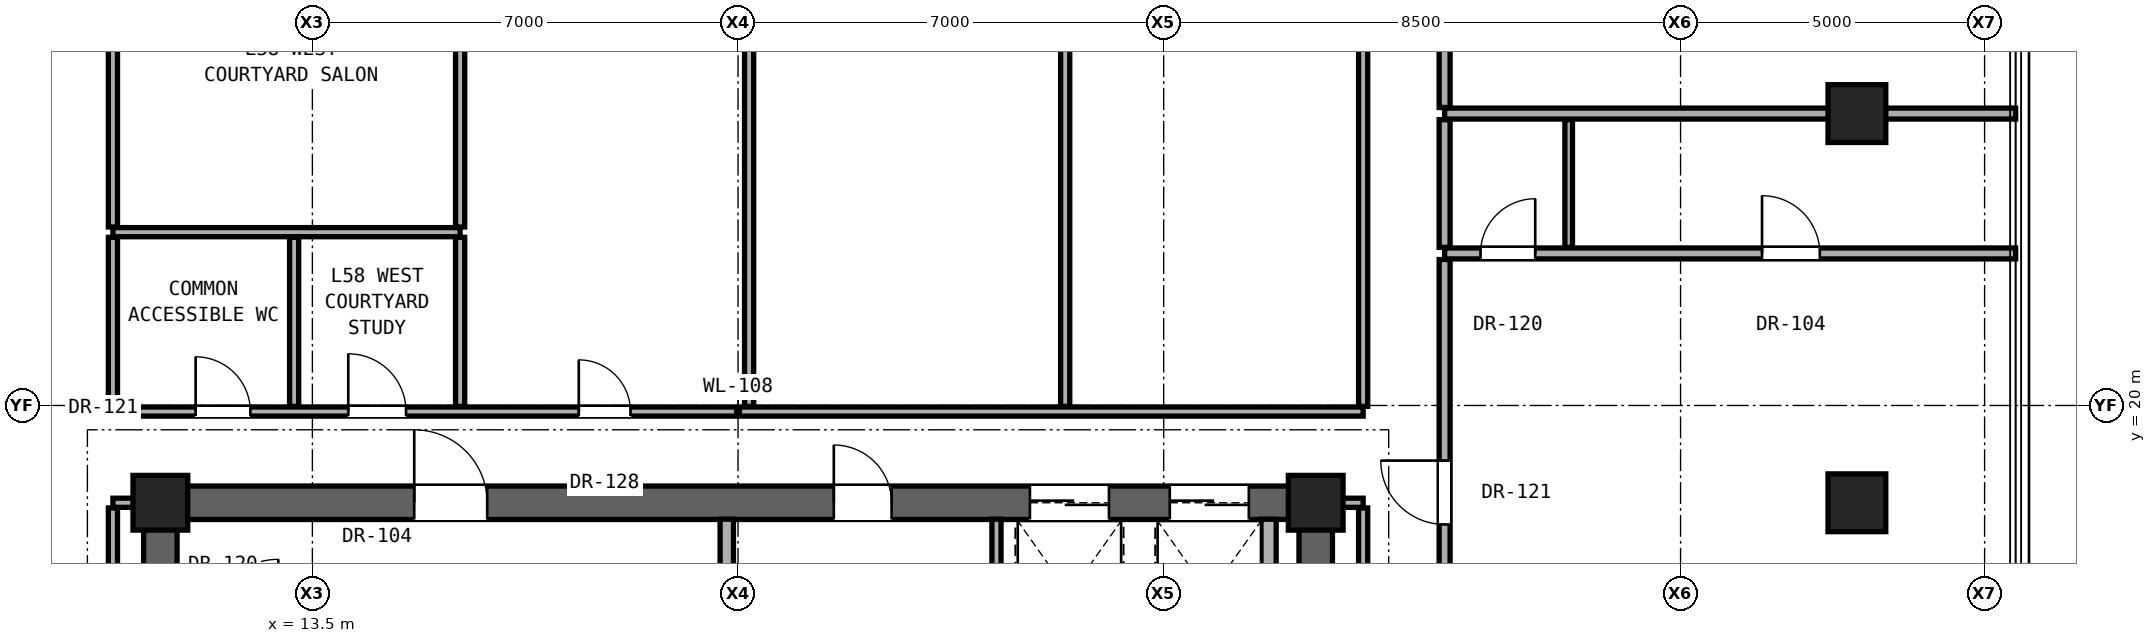
"""IFC4 building model, lengths in metres.
Left out: names, types, materials, properties, quantities, classifications, styles, units other than length and angle.
Written with IfcOpenShell. Run it as: python <this file> out.ifc"""

import sys

from ifc_helpers import new_model, si_unit, direction, frame, frame_2d, origin, origin_2d, place, context, subcontext, project, spatial, rectangle, hollow_rectangle, extrude, element, fill, save


model = new_model("IFC4")
c1 = context("Model", 3, precision=1e-05, world=origin(), true_north=direction((0.0, 1.0)))
c2 = subcontext(c1, "Body", "Model", "MODEL_VIEW")
j1 = project(units=[si_unit("LENGTHUNIT", "METRE"), si_unit("PLANEANGLEUNIT", "RADIAN")], contexts=[c1])
p1 = place(None, origin())
s1 = spatial("IfcSite", under=j1, at=p1, CompositionType="ELEMENT")
p2 = place(p1, origin())
s2 = spatial("IfcBuilding", under=s1, at=p2, CompositionType="ELEMENT")
p3 = place(p2, frame((0.0, 0.0, 203.15)))
s3 = spatial("IfcBuildingStorey", under=s2, at=p3, CompositionType="ELEMENT", Elevation=203.15)
for number, where, z_axis, x_axis in (
    (1, (11.0, 18.4, 0.0), (0.0, 0.0, 1.0), (1.0, 0.0, 0.0)),
    (2, (30.0, 18.4, 0.0), (0.0, 0.0, 1.0), (1.0, 0.0, 0.0)),
):
    element("IfcColumn", number, at=place(p3, frame(where, z_axis=z_axis, x_axis=x_axis)), inside=s3, PredefinedType="COLUMN", context=c2, shape_type="SweptSolid", body=[
        extrude(rectangle(XDim=0.9, YDim=0.9, at=origin_2d()), origin(), (0.0, 0.0, 1.0), 3.25),
    ])
for number, where, z_axis, x_axis in (
    (3, (38.9, 18.4, 0.0), (0.0, 0.0, 1.0), (1.0, 0.0, 0.0)),
    (4, (38.9, 24.8, 0.0), (0.0, 0.0, 1.0), (1.0, 0.0, 0.0)),
):
    element("IfcColumn", number, at=place(p3, frame(where, z_axis=z_axis, x_axis=x_axis)), inside=s3, PredefinedType="COLUMN", context=c2, shape_type="SweptSolid", body=[
        extrude(hollow_rectangle(XDim=0.95, YDim=0.95, WallThickness=0.05, at=origin_2d()), origin(), (0.0, 0.0, 1.0), 3.25),
    ])
for number, where, z_axis, x_axis in (
    (5, (11.0, 12.4, 0.0), (0.0, 0.0, 1.0), (0.0, 1.0, 0.0)),
    (6, (30.0, 12.4, 0.0), (0.0, 0.0, 1.0), (0.0, 1.0, 0.0)),
):
    element("IfcWall", number, at=place(p3, frame(where, z_axis=z_axis, x_axis=x_axis)), inside=s3, PredefinedType="SHEAR", context=c2, shape_type="SweptSolid", body=[
        extrude(rectangle(XDim=6.0, YDim=0.55, at=frame_2d((3.0, 0.0))), origin(), (0.0, 0.0, 1.0), 3.05),
    ])
p4 = place(p3, frame((11.0, 18.4, 0.0), z_axis=(0.0, 0.0, 1.0), x_axis=(1.0, 0.0, 0.0)))
e7 = element("IfcWall", 7, at=p4, inside=s3, PredefinedType="SHEAR", context=c2, shape_type="SweptSolid", body=[
    extrude(rectangle(XDim=19.0, YDim=0.55, at=frame_2d((9.5, 0.0))), origin(), (0.0, 0.0, 1.0), 3.05),
])
p5 = place(p4, frame((4.175, 0.0, 0.0)))
e8 = element("IfcOpeningElement", 8, at=p5, cuts=e7, PredefinedType="OPENING", context=c2, shape_type="SweptSolid", body=[
    extrude(rectangle(XDim=1.2, YDim=2.25, at=frame_2d((0.6, 1.125))), frame((0.0, 0.285, 0.0), z_axis=(0.0, -1.0, 0.0), x_axis=(1.0, 0.0, 0.0)), (0.0, 0.0, 1.0), 0.57),
])
p6 = place(p4, frame((11.075, 0.0, 0.0)))
e9 = element("IfcOpeningElement", 9, at=p6, cuts=e7, PredefinedType="OPENING", context=c2, shape_type="SweptSolid", body=[
    extrude(rectangle(XDim=0.95, YDim=2.15, at=frame_2d((0.475, 1.075))), frame((0.0, 0.285, 0.0), z_axis=(0.0, -1.0, 0.0), x_axis=(1.0, 0.0, 0.0)), (0.0, 0.0, 1.0), 0.57),
])
p7 = place(p4, frame((14.3, 0.0, 0.0)))
e10 = element("IfcOpeningElement", 10, at=p7, cuts=e7, PredefinedType="OPENING", context=c2, shape_type="SweptSolid", body=[
    extrude(rectangle(XDim=1.3, YDim=2.3, at=frame_2d((0.65, 1.15))), frame((0.0, 0.285, 0.0), z_axis=(0.0, -1.0, 0.0), x_axis=(1.0, 0.0, 0.0)), (0.0, 0.0, 1.0), 0.57),
])
p8 = place(p4, frame((16.6, 0.0, 0.0)))
e11 = element("IfcOpeningElement", 11, at=p8, cuts=e7, PredefinedType="OPENING", context=c2, shape_type="SweptSolid", body=[
    extrude(rectangle(XDim=1.3, YDim=2.3, at=frame_2d((0.65, 1.15))), frame((0.0, 0.285, 0.0), z_axis=(0.0, -1.0, 0.0), x_axis=(1.0, 0.0, 0.0)), (0.0, 0.0, 1.0), 0.57),
])
for number, where, z_axis, x_axis in (
    (12, (10.22, 18.4, 0.0), (0.0, 0.0, 1.0), (1.0, 0.0, 0.0)),
    (13, (30.27, 18.4, 0.0), (0.0, 0.0, 1.0), (1.0, 0.0, 0.0)),
):
    element("IfcWall", number, at=place(p3, frame(where, z_axis=z_axis, x_axis=x_axis)), inside=s3, PredefinedType="PARTITIONING", context=c2, shape_type="SweptSolid", body=[
        extrude(rectangle(XDim=0.51, YDim=0.15, at=frame_2d((0.255, 0.0))), origin(), (0.0, 0.0, 1.0), 2.442),
    ])
p9 = place(p3, frame((10.22, 19.9, 0.0), z_axis=(0.0, 0.0, 1.0), x_axis=(1.0, 0.0, 0.0)))
e14 = element("IfcWall", 14, at=p9, inside=s3, PredefinedType="PARTITIONING", context=c2, shape_type="SweptSolid", body=[
    extrude(rectangle(XDim=20.56, YDim=0.15, at=frame_2d((10.28, 0.0))), origin(), (0.0, 0.0, 1.0), 2.186),
])
p10 = place(p9, frame((1.36, 0.0, 0.0)))
e15 = element("IfcOpeningElement", 15, at=p10, cuts=e14, PredefinedType="OPENING", context=c2, shape_type="SweptSolid", body=[
    extrude(rectangle(XDim=0.9, YDim=2.1, at=frame_2d((0.45, 1.05))), frame((0.0, 0.085, 0.0), z_axis=(0.0, -1.0, 0.0), x_axis=(1.0, 0.0, 0.0)), (0.0, 0.0, 1.0), 0.17),
])
p11 = place(p9, frame((3.87, 0.0, 0.0)))
e16 = element("IfcOpeningElement", 16, at=p11, cuts=e14, PredefinedType="OPENING", context=c2, shape_type="SweptSolid", body=[
    extrude(rectangle(XDim=0.95, YDim=2.15, at=frame_2d((0.475, 1.075))), frame((0.0, 0.085, 0.0), z_axis=(0.0, -1.0, 0.0), x_axis=(1.0, 0.0, 0.0)), (0.0, 0.0, 1.0), 0.17),
])
p12 = place(p9, frame((7.661, 0.0, 0.0)))
e17 = element("IfcOpeningElement", 17, at=p12, cuts=e14, PredefinedType="OPENING", context=c2, shape_type="SweptSolid", body=[
    extrude(rectangle(XDim=0.85, YDim=2.01, at=frame_2d((0.425, 1.005))), frame((0.0, 0.085, 0.0), z_axis=(0.0, -1.0, 0.0), x_axis=(1.0, 0.0, 0.0)), (0.0, 0.0, 1.0), 0.17),
])
p13 = place(p3, frame((32.12, 22.5, 0.0), z_axis=(0.0, 0.0, 1.0), x_axis=(1.0, 0.0, 0.0)))
e18 = element("IfcWall", 18, at=p13, inside=s3, PredefinedType="PARTITIONING", context=c2, shape_type="SweptSolid", body=[
    extrude(rectangle(XDim=9.39, YDim=0.18, at=frame_2d((4.695, 0.0))), origin(), (0.0, 0.0, 1.0), 2.269),
])
p14 = place(p13, frame((5.22, 0.0, 0.0)))
e19 = element("IfcOpeningElement", 19, at=p14, cuts=e18, PredefinedType="OPENING", context=c2, shape_type="SweptSolid", body=[
    extrude(rectangle(XDim=0.95, YDim=2.15, at=frame_2d((0.475, 1.075))), frame((0.0, 0.1, 0.0), z_axis=(0.0, -1.0, 0.0), x_axis=(1.0, 0.0, 0.0)), (0.0, 0.0, 1.0), 0.2),
])
p15 = place(p13, frame((0.59, 0.0, 0.0)))
e20 = element("IfcOpeningElement", 20, at=p15, cuts=e18, PredefinedType="OPENING", context=c2, shape_type="SweptSolid", body=[
    extrude(rectangle(XDim=0.9, YDim=2.1, at=frame_2d((0.45, 1.05))), frame((0.0, 0.1, 0.0), z_axis=(0.0, -1.0, 0.0), x_axis=(1.0, 0.0, 0.0)), (0.0, 0.0, 1.0), 0.2),
])
p16 = place(p3, frame((10.22, 22.85, 0.0), z_axis=(0.0, 0.0, 1.0), x_axis=(1.0, 0.0, 0.0)))
e21 = element("IfcWall", 21, at=p16, inside=s3, PredefinedType="PARTITIONING", context=c2, shape_type="SweptSolid", body=[
    extrude(rectangle(XDim=5.71, YDim=0.15, at=frame_2d((2.855, 0.0))), origin(), (0.0, 0.0, 1.0), 2.186),
])
p17 = place(p3, frame((32.12, 24.8, 0.0), z_axis=(0.0, 0.0, 1.0), x_axis=(1.0, 0.0, 0.0)))
e22 = element("IfcWall", 22, at=p17, inside=s3, PredefinedType="PARTITIONING", context=c2, shape_type="SweptSolid", body=[
    extrude(rectangle(XDim=9.39, YDim=0.18, at=frame_2d((4.695, 0.0))), origin(), (0.0, 0.0, 1.0), 2.269),
])
p18 = place(p3, frame((10.22, 12.335, 0.0), z_axis=(0.0, 0.0, 1.0), x_axis=(0.0, 1.0, 0.0)))
e23 = element("IfcWall", 23, at=p18, inside=s3, PredefinedType="PARTITIONING", context=c2, shape_type="SweptSolid", body=[
    extrude(rectangle(XDim=5.98, YDim=0.15, at=frame_2d((2.99, 0.0))), origin(), (0.0, 0.0, 1.0), 2.442),
])
p19 = place(p3, frame((10.22, 19.985, 0.0), z_axis=(0.0, 0.0, 1.0), x_axis=(0.0, 1.0, 0.0)))
e24 = element("IfcWall", 24, at=p19, inside=s3, PredefinedType="PARTITIONING", context=c2, shape_type="SweptSolid", body=[
    extrude(rectangle(XDim=2.78, YDim=0.15, at=frame_2d((1.39, 0.0))), origin(), (0.0, 0.0, 1.0), 3.05),
])
p20 = place(p3, frame((10.22, 22.935, 0.0), z_axis=(0.0, 0.0, 1.0), x_axis=(0.0, 1.0, 0.0)))
e25 = element("IfcWall", 25, at=p20, inside=s3, PredefinedType="PARTITIONING", context=c2, shape_type="SweptSolid", body=[
    extrude(rectangle(XDim=10.08, YDim=0.15, at=frame_2d((5.04, 0.0))), origin(), (0.0, 0.0, 1.0), 2.346),
])
p21 = place(p20, frame((4.565, 0.0, 0.0)))
e26 = element("IfcOpeningElement", 26, at=p21, cuts=e25, PredefinedType="OPENING", context=c2, shape_type="SweptSolid", body=[
    extrude(rectangle(XDim=0.95, YDim=2.15, at=frame_2d((0.475, 1.075))), frame((0.0, 0.085, 0.0), z_axis=(0.0, -1.0, 0.0), x_axis=(1.0, 0.0, 0.0)), (0.0, 0.0, 1.0), 0.17),
])
for number, where, z_axis, x_axis in (
    (27, (13.2, 19.985, 0.0), (0.0, 0.0, 1.0), (0.0, 1.0, 0.0)),
    (28, (15.93, 19.985, 0.0), (0.0, 0.0, 1.0), (0.0, 1.0, 0.0)),
):
    element("IfcWall", number, at=place(p3, frame(where, z_axis=z_axis, x_axis=x_axis)), inside=s3, PredefinedType="PARTITIONING", context=c2, shape_type="SweptSolid", body=[
        extrude(rectangle(XDim=2.78, YDim=0.15, at=frame_2d((1.39, 0.0))), origin(), (0.0, 0.0, 1.0), 3.05),
    ])
p22 = place(p3, frame((15.93, 22.935, 0.0), z_axis=(0.0, 0.0, 1.0), x_axis=(0.0, 1.0, 0.0)))
e29 = element("IfcWall", 29, at=p22, inside=s3, PredefinedType="PARTITIONING", context=c2, shape_type="SweptSolid", body=[
    extrude(rectangle(XDim=10.08, YDim=0.15, at=frame_2d((5.04, 0.0))), origin(), (0.0, 0.0, 1.0), 2.186),
])
p23 = place(p3, frame((20.315, 16.555, 0.0), z_axis=(0.0, 0.0, 1.0), x_axis=(0.0, 1.0, 0.0)))
e30 = element("IfcWall", 30, at=p23, inside=s3, PredefinedType="SOLIDWALL", context=c2, shape_type="SweptSolid", body=[
    extrude(rectangle(XDim=1.575, YDim=0.22, at=frame_2d((0.788, 0.0))), origin(), (0.0, 0.0, 1.0), 3.05),
])
p24 = place(p3, frame((20.682, 19.985, 0.0), z_axis=(0.0, 0.0, 1.0), x_axis=(0.0, 1.0, 0.0)))
e31 = element("IfcWall", 31, at=p24, inside=s3, PredefinedType="PARTITIONING", context=c2, shape_type="SweptSolid", body=[
    extrude(rectangle(XDim=13.03, YDim=0.15, at=frame_2d((6.515, 0.0))), origin(), (0.0, 0.0, 1.0), 2.186),
])
p25 = place(p3, frame((24.75, 15.573, 0.0), z_axis=(0.0, 0.0, 1.0), x_axis=(0.0, 1.0, 0.0)))
e32 = element("IfcWall", 32, at=p25, inside=s3, PredefinedType="PARTITIONING", context=c2, shape_type="SweptSolid", body=[
    extrude(rectangle(XDim=2.557, YDim=0.15, at=frame_2d((1.279, 0.0))), origin(), (0.0, 0.0, 1.0), 3.05),
])
p26 = place(p3, frame((25.88, 19.985, 0.0), z_axis=(0.0, 0.0, 1.0), x_axis=(0.0, 1.0, 0.0)))
e33 = element("IfcWall", 33, at=p26, inside=s3, PredefinedType="PARTITIONING", context=c2, shape_type="SweptSolid", body=[
    extrude(rectangle(XDim=13.03, YDim=0.15, at=frame_2d((6.515, 0.0))), origin(), (0.0, 0.0, 1.0), 2.186),
])
p27 = place(p3, frame((29.225, 15.573, 0.0), z_axis=(0.0, 0.0, 1.0), x_axis=(0.0, 1.0, 0.0)))
e34 = element("IfcWall", 34, at=p27, inside=s3, PredefinedType="SOLIDWALL", context=c2, shape_type="SweptSolid", body=[
    extrude(rectangle(XDim=2.557, YDim=0.25, at=frame_2d((1.279, 0.0))), origin(), (0.0, 0.0, 1.0), 3.05),
])
p28 = place(p3, frame((30.78, 12.335, 0.0), z_axis=(0.0, 0.0, 1.0), x_axis=(0.0, 1.0, 0.0)))
e35 = element("IfcWall", 35, at=p28, inside=s3, PredefinedType="PARTITIONING", context=c2, shape_type="SweptSolid", body=[
    extrude(rectangle(XDim=5.98, YDim=0.15, at=frame_2d((2.99, 0.0))), origin(), (0.0, 0.0, 1.0), 2.442),
])
p29 = place(p3, frame((30.78, 19.985, 0.0), z_axis=(0.0, 0.0, 1.0), x_axis=(0.0, 1.0, 0.0)))
e36 = element("IfcWall", 36, at=p29, inside=s3, PredefinedType="PARTITIONING", context=c2, shape_type="SweptSolid", body=[
    extrude(rectangle(XDim=13.03, YDim=0.15, at=frame_2d((6.515, 0.0))), origin(), (0.0, 0.0, 1.0), 2.346),
])
p30 = place(p3, frame((32.12, 14.737, 0.0), z_axis=(0.0, 0.0, 1.0), x_axis=(0.0, 1.0, 0.0)))
e37 = element("IfcWall", 37, at=p30, inside=s3, PredefinedType="PARTITIONING", context=c2, shape_type="SweptSolid", body=[
    extrude(rectangle(XDim=7.663, YDim=0.18, at=frame_2d((3.832, 0.0))), origin(), (0.0, 0.0, 1.0), 2.442),
])
p31 = place(p30, frame((3.306, 0.0, 0.0)))
e38 = element("IfcOpeningElement", 38, at=p31, cuts=e37, PredefinedType="OPENING", context=c2, shape_type="SweptSolid", body=[
    extrude(rectangle(XDim=1.05, YDim=2.2, at=frame_2d((0.525, 1.1))), frame((0.0, 0.1, 0.0), z_axis=(0.0, -1.0, 0.0), x_axis=(1.0, 0.0, 0.0)), (0.0, 0.0, 1.0), 0.2),
])
p32 = place(p3, frame((32.12, 22.6, 0.0), z_axis=(0.0, 0.0, 1.0), x_axis=(0.0, 1.0, 0.0)))
e39 = element("IfcWall", 39, at=p32, inside=s3, PredefinedType="PARTITIONING", context=c2, shape_type="SweptSolid", body=[
    extrude(rectangle(XDim=2.1, YDim=0.18, at=frame_2d((1.05, 0.0))), origin(), (0.0, 0.0, 1.0), 2.346),
])
p33 = place(p3, frame((32.12, 24.9, 0.0), z_axis=(0.0, 0.0, 1.0), x_axis=(0.0, 1.0, 0.0)))
e40 = element("IfcWall", 40, at=p33, inside=s3, PredefinedType="PARTITIONING", context=c2, shape_type="SweptSolid", body=[
    extrude(rectangle(XDim=3.9, YDim=0.18, at=frame_2d((1.95, 0.0))), origin(), (0.0, 0.0, 1.0), 2.346),
])
p34 = place(p33, frame((1.425, 0.0, 0.0)))
e41 = element("IfcOpeningElement", 41, at=p34, cuts=e40, PredefinedType="OPENING", context=c2, shape_type="SweptSolid", body=[
    extrude(rectangle(XDim=1.05, YDim=2.2, at=frame_2d((0.525, 1.1))), frame((0.0, 0.1, 0.0), z_axis=(0.0, -1.0, 0.0), x_axis=(1.0, 0.0, 0.0)), (0.0, 0.0, 1.0), 0.2),
])
p35 = place(p3, frame((34.16, 22.6, 0.0), z_axis=(0.0, 0.0, 1.0), x_axis=(0.0, 1.0, 0.0)))
e42 = element("IfcWall", 42, at=p35, inside=s3, PredefinedType="PARTITIONING", context=c2, shape_type="SweptSolid", body=[
    extrude(rectangle(XDim=2.1, YDim=0.125, at=frame_2d((1.05, 0.0))), origin(), (0.0, 0.0, 1.0), 2.346),
])
p36 = place(p5, origin())
e43 = element("IfcDoor", 43, at=p36, inside=s3, OperationType="SINGLE_SWING_LEFT", PredefinedType="DOOR", context=c2, shape_type="SweptSolid", body=[
    extrude(rectangle(XDim=1.2, YDim=2.25, at=frame_2d((0.6, 1.125))), frame((0.0, 0.025, 0.0), z_axis=(0.0, -1.0, 0.0), x_axis=(1.0, 0.0, 0.0)), (0.0, 0.0, 1.0), 0.05),
])
fill(e8, e43)
p37 = place(p6, origin())
e44 = element("IfcDoor", 44, at=p37, inside=s3, OperationType="SINGLE_SWING_LEFT", PredefinedType="DOOR", context=c2, shape_type="SweptSolid", body=[
    extrude(rectangle(XDim=0.95, YDim=2.15, at=frame_2d((0.475, 1.075))), frame((0.0, 0.025, 0.0), z_axis=(0.0, -1.0, 0.0), x_axis=(1.0, 0.0, 0.0)), (0.0, 0.0, 1.0), 0.05),
])
fill(e9, e44)
p38 = place(p10, origin())
e45 = element("IfcDoor", 45, at=p38, inside=s3, OperationType="SINGLE_SWING_LEFT", PredefinedType="DOOR", context=c2, shape_type="SweptSolid", body=[
    extrude(rectangle(XDim=0.9, YDim=2.1, at=frame_2d((0.45, 1.05))), frame((0.0, 0.025, 0.0), z_axis=(0.0, -1.0, 0.0), x_axis=(1.0, 0.0, 0.0)), (0.0, 0.0, 1.0), 0.05),
])
fill(e15, e45)
p39 = place(p31, origin())
e46 = element("IfcDoor", 46, at=p39, inside=s3, OperationType="SINGLE_SWING_RIGHT", PredefinedType="DOOR", context=c2, shape_type="SweptSolid", body=[
    extrude(rectangle(XDim=1.05, YDim=2.2, at=frame_2d((0.525, 1.1))), frame((0.0, 0.025, 0.0), z_axis=(0.0, -1.0, 0.0), x_axis=(1.0, 0.0, 0.0)), (0.0, 0.0, 1.0), 0.05),
])
fill(e38, e46)
p40 = place(p14, origin())
e47 = element("IfcDoor", 47, at=p40, inside=s3, OperationType="SINGLE_SWING_LEFT", PredefinedType="DOOR", context=c2, shape_type="SweptSolid", body=[
    extrude(rectangle(XDim=0.95, YDim=2.15, at=frame_2d((0.475, 1.075))), frame((0.0, 0.025, 0.0), z_axis=(0.0, -1.0, 0.0), x_axis=(1.0, 0.0, 0.0)), (0.0, 0.0, 1.0), 0.05),
])
fill(e19, e47)
p41 = place(p15, origin())
e48 = element("IfcDoor", 48, at=p41, inside=s3, OperationType="SINGLE_SWING_RIGHT", PredefinedType="DOOR", context=c2, shape_type="SweptSolid", body=[
    extrude(rectangle(XDim=0.9, YDim=2.1, at=frame_2d((0.45, 1.05))), frame((0.0, 0.025, 0.0), z_axis=(0.0, -1.0, 0.0), x_axis=(1.0, 0.0, 0.0)), (0.0, 0.0, 1.0), 0.05),
])
fill(e20, e48)
p42 = place(p11, origin())
e49 = element("IfcDoor", 49, at=p42, inside=s3, OperationType="SINGLE_SWING_LEFT", PredefinedType="DOOR", context=c2, shape_type="SweptSolid", body=[
    extrude(rectangle(XDim=0.95, YDim=2.15, at=frame_2d((0.475, 1.075))), frame((0.0, 0.025, 0.0), z_axis=(0.0, -1.0, 0.0), x_axis=(1.0, 0.0, 0.0)), (0.0, 0.0, 1.0), 0.05),
])
fill(e16, e49)
p43 = place(p12, origin())
e50 = element("IfcDoor", 50, at=p43, inside=s3, OperationType="SINGLE_SWING_LEFT", PredefinedType="DOOR", context=c2, shape_type="SweptSolid", body=[
    extrude(rectangle(XDim=0.85, YDim=2.01, at=frame_2d((0.425, 1.005))), frame((0.0, 0.025, 0.0), z_axis=(0.0, -1.0, 0.0), x_axis=(1.0, 0.0, 0.0)), (0.0, 0.0, 1.0), 0.05),
])
fill(e17, e50)
p44 = place(p7, origin())
e51 = element("IfcDoor", 51, at=p44, inside=s3, OperationType="DOUBLE_DOOR_SLIDING", PredefinedType="DOOR", context=c2, shape_type="SweptSolid", body=[
    extrude(rectangle(XDim=1.3, YDim=2.3, at=frame_2d((0.65, 1.15))), frame((0.0, 0.025, 0.0), z_axis=(0.0, -1.0, 0.0), x_axis=(1.0, 0.0, 0.0)), (0.0, 0.0, 1.0), 0.05),
])
fill(e10, e51)
p45 = place(p8, origin())
e52 = element("IfcDoor", 52, at=p45, inside=s3, OperationType="DOUBLE_DOOR_SLIDING", PredefinedType="DOOR", context=c2, shape_type="SweptSolid", body=[
    extrude(rectangle(XDim=1.3, YDim=2.3, at=frame_2d((0.65, 1.15))), frame((0.0, 0.025, 0.0), z_axis=(0.0, -1.0, 0.0), x_axis=(1.0, 0.0, 0.0)), (0.0, 0.0, 1.0), 0.05),
])
fill(e11, e52)
save(model, sys.argv[1])
